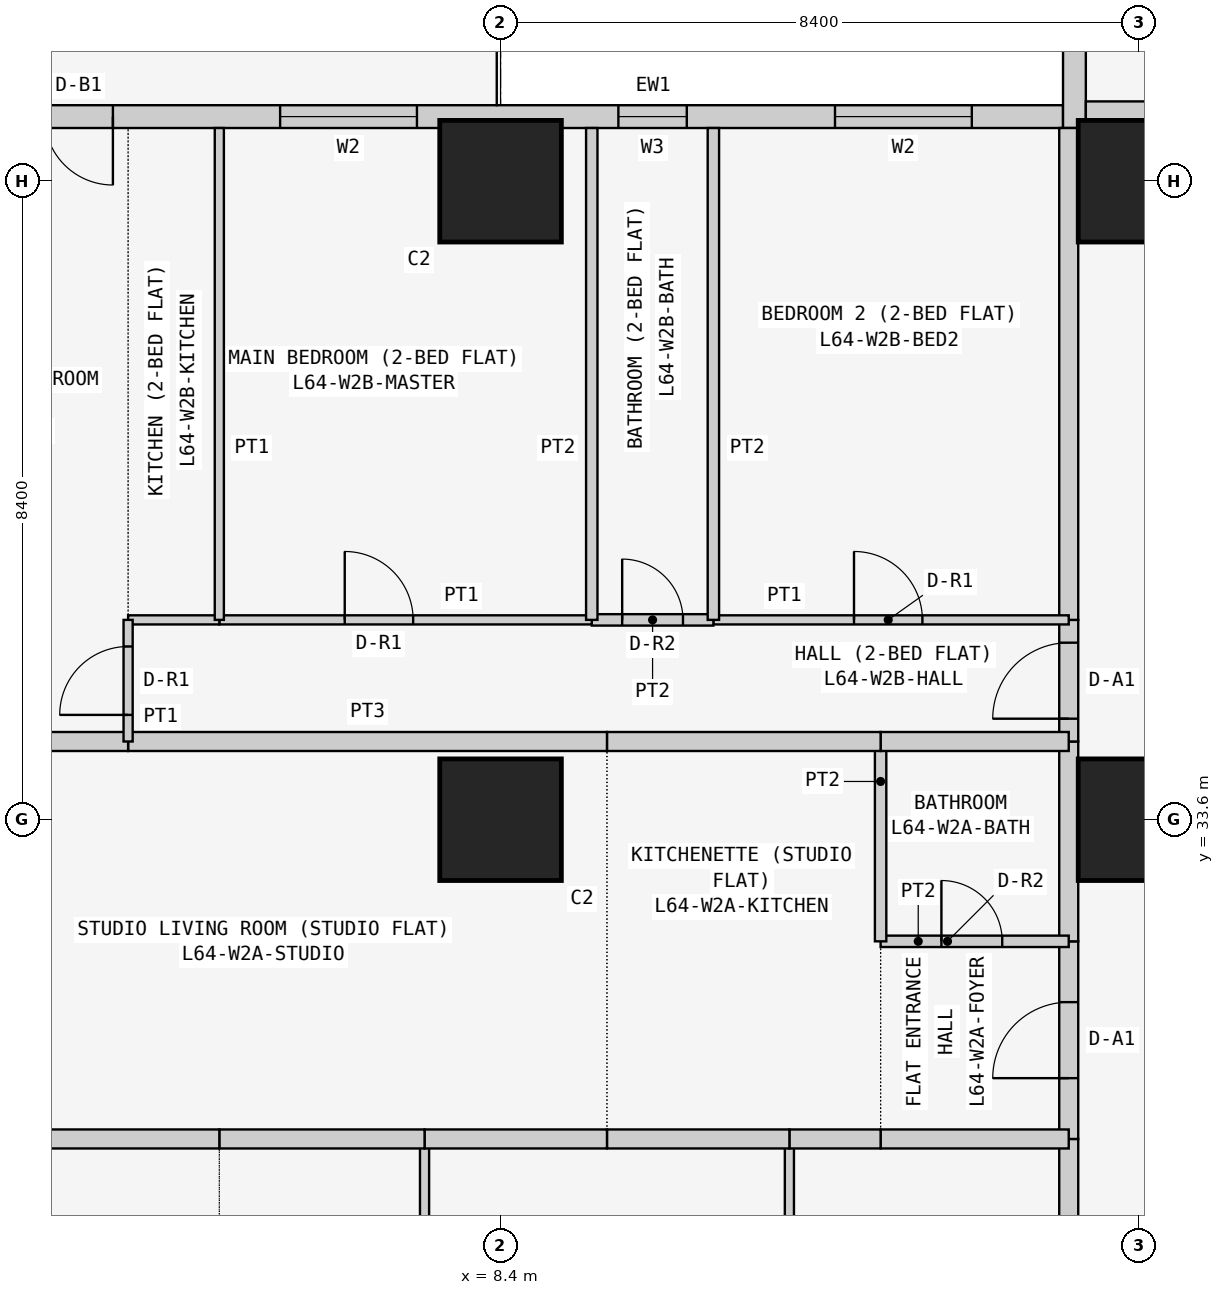
"""IFC4 building model, lengths in metres.
Left out: names, types, materials, properties, quantities, classifications, styles, units other than length and angle.
Written with IfcOpenShell. Run it as: python <this file> out.ifc"""

import sys

from ifc_helpers import new_model, si_unit, direction, frame, frame_2d, origin, origin_2d, place, context, subcontext, project, spatial, rectangle, extrude, element, fill, save


model = new_model("IFC4")
c1 = context("Model", 3, precision=1e-05, world=origin(), true_north=direction((0.0, 1.0)))
c2 = subcontext(c1, "Body", "Model", "MODEL_VIEW")
j1 = project(units=[si_unit("LENGTHUNIT", "METRE"), si_unit("PLANEANGLEUNIT", "RADIAN")], contexts=[c1])
p1 = place(None, origin())
s1 = spatial("IfcSite", under=j1, at=p1, CompositionType="ELEMENT")
p2 = place(p1, origin())
s2 = spatial("IfcBuilding", under=s1, at=p2, CompositionType="ELEMENT")
p3 = place(p2, frame((0.0, 0.0, 244.5)))
s3 = spatial("IfcBuildingStorey", under=s2, at=p3, CompositionType="ELEMENT", Elevation=244.5)
for number, where, z_axis, x_axis in (
    (1, (8.4, 33.6, 0.0), (0.0, 0.0, 1.0), (1.0, 0.0, 0.0)),
    (2, (8.4, 42.0, 0.0), (0.0, 0.0, 1.0), (1.0, 0.0, 0.0)),
    (3, (16.8, 33.6, 0.0), (0.0, 0.0, 1.0), (1.0, 0.0, 0.0)),
    (4, (16.8, 42.0, 0.0), (0.0, 0.0, 1.0), (1.0, 0.0, 0.0)),
):
    element("IfcColumn", number, at=place(p3, frame(where, z_axis=z_axis, x_axis=x_axis)), inside=s3, PredefinedType="COLUMN", context=c2, shape_type="SweptSolid", body=[
        extrude(rectangle(XDim=1.6, YDim=1.6, at=origin_2d()), origin(), (0.0, 0.0, 1.0), 3.6),
    ])
p4 = place(p3, frame((15.8, 42.85, 0.0), z_axis=(0.0, 0.0, 1.0), x_axis=(-1.0, 0.0, 0.0)))
e5 = element("IfcWall", 5, at=p4, inside=s3, PredefinedType="SOLIDWALL", context=c2, shape_type="SweptSolid", body=[
    extrude(rectangle(XDim=15.4, YDim=0.3, at=frame_2d((7.7, 0.0))), origin(), (0.0, 0.0, 1.0), 3.35),
])
p5 = place(p4, frame((1.2, 0.0, 0.9)))
e6 = element("IfcOpeningElement", 6, at=p5, cuts=e5, PredefinedType="OPENING", context=c2, shape_type="SweptSolid", body=[
    extrude(rectangle(XDim=1.8, YDim=1.5, at=frame_2d((0.9, 0.75))), frame((0.0, 0.16, 0.0), z_axis=(0.0, -1.0, 0.0), x_axis=(1.0, 0.0, 0.0)), (0.0, 0.0, 1.0), 0.32),
])
p6 = place(p4, frame((4.95, 0.0, 1.5)))
e7 = element("IfcOpeningElement", 7, at=p6, cuts=e5, PredefinedType="OPENING", context=c2, shape_type="SweptSolid", body=[
    extrude(rectangle(XDim=0.9, YDim=0.7, at=frame_2d((0.45, 0.35))), frame((0.0, 0.16, 0.0), z_axis=(0.0, -1.0, 0.0), x_axis=(1.0, 0.0, 0.0)), (0.0, 0.0, 1.0), 0.32),
])
p7 = place(p4, frame((8.5, 0.0, 0.9)))
e8 = element("IfcOpeningElement", 8, at=p7, cuts=e5, PredefinedType="OPENING", context=c2, shape_type="SweptSolid", body=[
    extrude(rectangle(XDim=1.8, YDim=1.5, at=frame_2d((0.9, 0.75))), frame((0.0, 0.16, 0.0), z_axis=(0.0, -1.0, 0.0), x_axis=(1.0, 0.0, 0.0)), (0.0, 0.0, 1.0), 0.32),
])
p8 = place(p4, frame((12.5, 0.0, 0.0)))
e9 = element("IfcOpeningElement", 9, at=p8, cuts=e5, PredefinedType="OPENING", context=c2, shape_type="SweptSolid", body=[
    extrude(rectangle(XDim=0.9, YDim=2.4, at=frame_2d((0.45, 1.2))), frame((0.0, 0.16, 0.0), z_axis=(0.0, -1.0, 0.0), x_axis=(1.0, 0.0, 0.0)), (0.0, 0.0, 1.0), 0.32),
])
p9 = place(p4, frame((13.5, 0.0, 0.9)))
e10 = element("IfcOpeningElement", 10, at=p9, cuts=e5, PredefinedType="OPENING", context=c2, shape_type="SweptSolid", body=[
    extrude(rectangle(XDim=1.2, YDim=1.5, at=frame_2d((0.6, 0.75))), frame((0.0, 0.16, 0.0), z_axis=(0.0, -1.0, 0.0), x_axis=(1.0, 0.0, 0.0)), (0.0, 0.0, 1.0), 0.32),
])
p10 = place(p3, frame((15.95, 50.0, 0.0), z_axis=(0.0, 0.0, 1.0), x_axis=(0.0, -1.0, 0.0)))
e11 = element("IfcWall", 11, at=p10, inside=s3, PredefinedType="SOLIDWALL", context=c2, shape_type="SweptSolid", body=[
    extrude(rectangle(XDim=7.3, YDim=0.3, at=frame_2d((3.65, 0.0))), origin(), (0.0, 0.0, 1.0), 3.35),
])
p11 = place(p10, frame((3.1, 0.0, 0.9)))
e12 = element("IfcOpeningElement", 12, at=p11, cuts=e11, PredefinedType="OPENING", context=c2, shape_type="SweptSolid", body=[
    extrude(rectangle(XDim=2.4, YDim=1.5, at=frame_2d((1.2, 0.75))), frame((0.0, 0.16, 0.0), z_axis=(0.0, -1.0, 0.0), x_axis=(1.0, 0.0, 0.0)), (0.0, 0.0, 1.0), 0.32),
])
p12 = place(p10, frame((0.75, 0.0, 0.9)))
e13 = element("IfcOpeningElement", 13, at=p12, cuts=e11, PredefinedType="OPENING", context=c2, shape_type="SweptSolid", body=[
    extrude(rectangle(XDim=1.2, YDim=1.5, at=frame_2d((0.6, 0.75))), frame((0.0, 0.16, 0.0), z_axis=(0.0, -1.0, 0.0), x_axis=(1.0, 0.0, 0.0)), (0.0, 0.0, 1.0), 0.32),
])
p13 = place(p3, frame((16.1, 42.925, 0.0), z_axis=(0.0, 0.0, 1.0), x_axis=(1.0, 0.0, 0.0)))
e14 = element("IfcWall", 14, at=p13, inside=s3, PredefinedType="PARTITIONING", context=c2, shape_type="SweptSolid", body=[
    extrude(rectangle(XDim=6.871, YDim=0.25, at=frame_2d((3.436, 0.0))), origin(), (0.0, 0.0, 1.0), 3.35),
])
p14 = place(p3, frame((15.875, 24.171, 0.0), z_axis=(0.0, 0.0, 1.0), x_axis=(0.0, 1.0, 0.0)))
e15 = element("IfcWall", 15, at=p14, inside=s3, PredefinedType="PARTITIONING", context=c2, shape_type="SweptSolid", body=[
    extrude(rectangle(XDim=5.229, YDim=0.25, at=frame_2d((2.615, 0.0))), origin(), (0.0, 0.0, 1.0), 3.35),
])
p15 = place(p14, frame((2.129, 0.0, 0.0)))
e16 = element("IfcOpeningElement", 16, at=p15, cuts=e15, PredefinedType="OPENING", context=c2, shape_type="SweptSolid", body=[
    extrude(rectangle(XDim=1.0, YDim=2.1, at=frame_2d((0.5, 1.05))), frame((0.0, 0.135, 0.0), z_axis=(0.0, -1.0, 0.0), x_axis=(1.0, 0.0, 0.0)), (0.0, 0.0, 1.0), 0.27),
])
p16 = place(p3, frame((15.875, 29.4, 0.0), z_axis=(0.0, 0.0, 1.0), x_axis=(0.0, 1.0, 0.0)))
e17 = element("IfcWall", 17, at=p16, inside=s3, PredefinedType="PARTITIONING", context=c2, shape_type="SweptSolid", body=[
    extrude(rectangle(XDim=2.6, YDim=0.25, at=frame_2d((1.3, 0.0))), origin(), (0.0, 0.0, 1.0), 3.35),
])
p17 = place(p16, frame((0.8, 0.0, 0.0)))
e18 = element("IfcOpeningElement", 18, at=p17, cuts=e17, PredefinedType="OPENING", context=c2, shape_type="SweptSolid", body=[
    extrude(rectangle(XDim=1.0, YDim=2.1, at=frame_2d((0.5, 1.05))), frame((0.0, 0.135, 0.0), z_axis=(0.0, -1.0, 0.0), x_axis=(1.0, 0.0, 0.0)), (0.0, 0.0, 1.0), 0.27),
])
p18 = place(p3, frame((15.875, 32.0, 0.0), z_axis=(0.0, 0.0, 1.0), x_axis=(0.0, 1.0, 0.0)))
e19 = element("IfcWall", 19, at=p18, inside=s3, PredefinedType="PARTITIONING", context=c2, shape_type="SweptSolid", body=[
    extrude(rectangle(XDim=2.629, YDim=0.25, at=frame_2d((1.314, 0.0))), origin(), (0.0, 0.0, 1.0), 3.35),
])
p19 = place(p3, frame((15.875, 34.629, 0.0), z_axis=(0.0, 0.0, 1.0), x_axis=(0.0, 1.0, 0.0)))
e20 = element("IfcWall", 20, at=p19, inside=s3, PredefinedType="PARTITIONING", context=c2, shape_type="SweptSolid", body=[
    extrude(rectangle(XDim=1.6, YDim=0.25, at=frame_2d((0.8, 0.0))), origin(), (0.0, 0.0, 1.0), 3.35),
])
p20 = place(p19, frame((0.3, 0.0, 0.0)))
e21 = element("IfcOpeningElement", 21, at=p20, cuts=e20, PredefinedType="OPENING", context=c2, shape_type="SweptSolid", body=[
    extrude(rectangle(XDim=1.0, YDim=2.1, at=frame_2d((0.5, 1.05))), frame((0.0, 0.135, 0.0), z_axis=(0.0, -1.0, 0.0), x_axis=(1.0, 0.0, 0.0)), (0.0, 0.0, 1.0), 0.27),
])
p21 = place(p3, frame((15.875, 36.229, 0.0), z_axis=(0.0, 0.0, 1.0), x_axis=(0.0, 1.0, 0.0)))
e22 = element("IfcWall", 22, at=p21, inside=s3, PredefinedType="PARTITIONING", context=c2, shape_type="SweptSolid", body=[
    extrude(rectangle(XDim=6.471, YDim=0.25, at=frame_2d((3.235, 0.0))), origin(), (0.0, 0.0, 1.0), 3.35),
])
p22 = place(p3, frame((12.2, 29.4, 0.0), z_axis=(0.0, 0.0, 1.0), x_axis=(0.0, -1.0, 0.0)))
e23 = element("IfcWall", 23, at=p22, inside=s3, PredefinedType="PARTITIONING", context=c2, shape_type="SweptSolid", body=[
    extrude(rectangle(XDim=5.229, YDim=0.12, at=frame_2d((2.615, 0.0))), origin(), (0.0, 0.0, 1.0), 3.35),
])
p23 = place(p3, frame((15.875, 29.4, 0.0), z_axis=(0.0, 0.0, 1.0), x_axis=(-1.0, 0.0, 0.0)))
e24 = element("IfcWall", 24, at=p23, inside=s3, PredefinedType="PARTITIONING", context=c2, shape_type="SweptSolid", body=[
    extrude(rectangle(XDim=2.475, YDim=0.25, at=frame_2d((1.238, 0.0))), origin(), (0.0, 0.0, 1.0), 3.35),
])
p24 = place(p3, frame((13.4, 29.4, 0.0), z_axis=(0.0, 0.0, 1.0), x_axis=(-1.0, 0.0, 0.0)))
e25 = element("IfcWall", 25, at=p24, inside=s3, PredefinedType="PARTITIONING", context=c2, shape_type="SweptSolid", body=[
    extrude(rectangle(XDim=1.2, YDim=0.25, at=frame_2d((0.6, 0.0))), origin(), (0.0, 0.0, 1.0), 3.35),
])
p25 = place(p3, frame((7.4, 29.4, 0.0), z_axis=(0.0, 0.0, 1.0), x_axis=(0.0, -1.0, 0.0)))
e26 = element("IfcWall", 26, at=p25, inside=s3, PredefinedType="PARTITIONING", context=c2, shape_type="SweptSolid", body=[
    extrude(rectangle(XDim=5.229, YDim=0.12, at=frame_2d((2.615, 0.0))), origin(), (0.0, 0.0, 1.0), 3.35),
])
p26 = place(p3, frame((12.2, 29.4, 0.0), z_axis=(0.0, 0.0, 1.0), x_axis=(-1.0, 0.0, 0.0)))
e27 = element("IfcWall", 27, at=p26, inside=s3, PredefinedType="PARTITIONING", context=c2, shape_type="SweptSolid", body=[
    extrude(rectangle(XDim=2.4, YDim=0.25, at=frame_2d((1.2, 0.0))), origin(), (0.0, 0.0, 1.0), 3.35),
])
p27 = place(p3, frame((9.8, 29.4, 0.0), z_axis=(0.0, 0.0, 1.0), x_axis=(-1.0, 0.0, 0.0)))
e28 = element("IfcWall", 28, at=p27, inside=s3, PredefinedType="PARTITIONING", context=c2, shape_type="SweptSolid", body=[
    extrude(rectangle(XDim=2.4, YDim=0.25, at=frame_2d((1.2, 0.0))), origin(), (0.0, 0.0, 1.0), 3.35),
])
p28 = place(p3, frame((7.4, 29.4, 0.0), z_axis=(0.0, 0.0, 1.0), x_axis=(-1.0, 0.0, 0.0)))
e29 = element("IfcWall", 29, at=p28, inside=s3, PredefinedType="PARTITIONING", context=c2, shape_type="SweptSolid", body=[
    extrude(rectangle(XDim=2.7, YDim=0.25, at=frame_2d((1.35, 0.0))), origin(), (0.0, 0.0, 1.0), 3.35),
])
p29 = place(p3, frame((4.7, 29.4, 0.0), z_axis=(0.0, 0.0, 1.0), x_axis=(-1.0, 0.0, 0.0)))
e30 = element("IfcWall", 30, at=p29, inside=s3, PredefinedType="PARTITIONING", context=c2, shape_type="SweptSolid", body=[
    extrude(rectangle(XDim=5.35, YDim=0.25, at=frame_2d((2.675, 0.0))), origin(), (0.0, 0.0, 1.0), 3.35),
])
p30 = place(p3, frame((13.4, 32.0, 0.0), z_axis=(0.0, 0.0, 1.0), x_axis=(1.0, 0.0, 0.0)))
e31 = element("IfcWall", 31, at=p30, inside=s3, PredefinedType="PARTITIONING", context=c2, shape_type="SweptSolid", body=[
    extrude(rectangle(XDim=2.475, YDim=0.15, at=frame_2d((1.238, 0.0))), origin(), (0.0, 0.0, 1.0), 3.35),
])
p31 = place(p30, frame((0.8, 0.0, 0.0)))
e32 = element("IfcOpeningElement", 32, at=p31, cuts=e31, PredefinedType="OPENING", context=c2, shape_type="SweptSolid", body=[
    extrude(rectangle(XDim=0.8, YDim=2.1, at=frame_2d((0.4, 1.05))), frame((0.0, 0.085, 0.0), z_axis=(0.0, -1.0, 0.0), x_axis=(1.0, 0.0, 0.0)), (0.0, 0.0, 1.0), 0.17),
])
p32 = place(p3, frame((13.4, 32.0, 0.0), z_axis=(0.0, 0.0, 1.0), x_axis=(0.0, 1.0, 0.0)))
e33 = element("IfcWall", 33, at=p32, inside=s3, PredefinedType="PARTITIONING", context=c2, shape_type="SweptSolid", body=[
    extrude(rectangle(XDim=2.629, YDim=0.15, at=frame_2d((1.314, 0.0))), origin(), (0.0, 0.0, 1.0), 3.35),
])
p33 = place(p3, frame((13.4, 34.629, 0.0), z_axis=(0.0, 0.0, 1.0), x_axis=(1.0, 0.0, 0.0)))
e34 = element("IfcWall", 34, at=p33, inside=s3, PredefinedType="PARTITIONING", context=c2, shape_type="SweptSolid", body=[
    extrude(rectangle(XDim=2.475, YDim=0.25, at=frame_2d((1.238, 0.0))), origin(), (0.0, 0.0, 1.0), 3.35),
])
p34 = place(p3, frame((9.8, 34.629, 0.0), z_axis=(0.0, 0.0, 1.0), x_axis=(1.0, 0.0, 0.0)))
e35 = element("IfcWall", 35, at=p34, inside=s3, PredefinedType="PARTITIONING", context=c2, shape_type="SweptSolid", body=[
    extrude(rectangle(XDim=3.6, YDim=0.25, at=frame_2d((1.8, 0.0))), origin(), (0.0, 0.0, 1.0), 3.35),
])
p35 = place(p3, frame((3.5, 34.629, 0.0), z_axis=(0.0, 0.0, 1.0), x_axis=(1.0, 0.0, 0.0)))
e36 = element("IfcWall", 36, at=p35, inside=s3, PredefinedType="PARTITIONING", context=c2, shape_type="SweptSolid", body=[
    extrude(rectangle(XDim=6.3, YDim=0.25, at=frame_2d((3.15, 0.0))), origin(), (0.0, 0.0, 1.0), 3.35),
])
p36 = place(p3, frame((-0.65, 34.629, 0.0), z_axis=(0.0, 0.0, 1.0), x_axis=(1.0, 0.0, 0.0)))
e37 = element("IfcWall", 37, at=p36, inside=s3, PredefinedType="PARTITIONING", context=c2, shape_type="SweptSolid", body=[
    extrude(rectangle(XDim=4.15, YDim=0.25, at=frame_2d((2.075, 0.0))), origin(), (0.0, 0.0, 1.0), 3.35),
])
p37 = place(p3, frame((11.2, 36.229, 0.0), z_axis=(0.0, 0.0, 1.0), x_axis=(1.0, 0.0, 0.0)))
e38 = element("IfcWall", 38, at=p37, inside=s3, PredefinedType="PARTITIONING", context=c2, shape_type="SweptSolid", body=[
    extrude(rectangle(XDim=4.675, YDim=0.12, at=frame_2d((2.337, 0.0))), origin(), (0.0, 0.0, 1.0), 3.35),
])
p38 = place(p37, frame((1.85, 0.0, 0.0)))
e39 = element("IfcOpeningElement", 39, at=p38, cuts=e38, PredefinedType="OPENING", context=c2, shape_type="SweptSolid", body=[
    extrude(rectangle(XDim=0.9, YDim=2.1, at=frame_2d((0.45, 1.05))), frame((0.0, 0.07, 0.0), z_axis=(0.0, -1.0, 0.0), x_axis=(1.0, 0.0, 0.0)), (0.0, 0.0, 1.0), 0.14),
])
p39 = place(p3, frame((9.6, 36.229, 0.0), z_axis=(0.0, 0.0, 1.0), x_axis=(1.0, 0.0, 0.0)))
e40 = element("IfcWall", 40, at=p39, inside=s3, PredefinedType="PARTITIONING", context=c2, shape_type="SweptSolid", body=[
    extrude(rectangle(XDim=1.6, YDim=0.15, at=frame_2d((0.8, 0.0))), origin(), (0.0, 0.0, 1.0), 3.35),
])
p40 = place(p39, frame((0.4, 0.0, 0.0)))
e41 = element("IfcOpeningElement", 41, at=p40, cuts=e40, PredefinedType="OPENING", context=c2, shape_type="SweptSolid", body=[
    extrude(rectangle(XDim=0.8, YDim=2.1, at=frame_2d((0.4, 1.05))), frame((0.0, 0.085, 0.0), z_axis=(0.0, -1.0, 0.0), x_axis=(1.0, 0.0, 0.0)), (0.0, 0.0, 1.0), 0.17),
])
p41 = place(p3, frame((4.7, 36.229, 0.0), z_axis=(0.0, 0.0, 1.0), x_axis=(1.0, 0.0, 0.0)))
e42 = element("IfcWall", 42, at=p41, inside=s3, PredefinedType="PARTITIONING", context=c2, shape_type="SweptSolid", body=[
    extrude(rectangle(XDim=4.9, YDim=0.12, at=frame_2d((2.45, 0.0))), origin(), (0.0, 0.0, 1.0), 3.35),
])
p42 = place(p41, frame((1.65, 0.0, 0.0)))
e43 = element("IfcOpeningElement", 43, at=p42, cuts=e42, PredefinedType="OPENING", context=c2, shape_type="SweptSolid", body=[
    extrude(rectangle(XDim=0.9, YDim=2.1, at=frame_2d((0.45, 1.05))), frame((0.0, 0.07, 0.0), z_axis=(0.0, -1.0, 0.0), x_axis=(1.0, 0.0, 0.0)), (0.0, 0.0, 1.0), 0.14),
])
p43 = place(p3, frame((3.5, 36.229, 0.0), z_axis=(0.0, 0.0, 1.0), x_axis=(1.0, 0.0, 0.0)))
e44 = element("IfcWall", 44, at=p43, inside=s3, PredefinedType="PARTITIONING", context=c2, shape_type="SweptSolid", body=[
    extrude(rectangle(XDim=1.2, YDim=0.12, at=frame_2d((0.6, 0.0))), origin(), (0.0, 0.0, 1.0), 3.35),
])
p44 = place(p3, frame((3.5, 34.629, 0.0), z_axis=(0.0, 0.0, 1.0), x_axis=(0.0, 1.0, 0.0)))
e45 = element("IfcWall", 45, at=p44, inside=s3, PredefinedType="PARTITIONING", context=c2, shape_type="SweptSolid", body=[
    extrude(rectangle(XDim=1.6, YDim=0.12, at=frame_2d((0.8, 0.0))), origin(), (0.0, 0.0, 1.0), 3.35),
])
p45 = place(p44, frame((0.35, 0.0, 0.0)))
e46 = element("IfcOpeningElement", 46, at=p45, cuts=e45, PredefinedType="OPENING", context=c2, shape_type="SweptSolid", body=[
    extrude(rectangle(XDim=0.9, YDim=2.1, at=frame_2d((0.45, 1.05))), frame((0.0, 0.07, 0.0), z_axis=(0.0, -1.0, 0.0), x_axis=(1.0, 0.0, 0.0)), (0.0, 0.0, 1.0), 0.14),
])
for number, where, z_axis, x_axis in (
    (47, (11.2, 36.229, 0.0), (0.0, 0.0, 1.0), (0.0, 1.0, 0.0)),
    (48, (9.6, 36.229, 0.0), (0.0, 0.0, 1.0), (0.0, 1.0, 0.0)),
):
    element("IfcWall", number, at=place(p3, frame(where, z_axis=z_axis, x_axis=x_axis)), inside=s3, PredefinedType="PARTITIONING", context=c2, shape_type="SweptSolid", body=[
        extrude(rectangle(XDim=6.471, YDim=0.15, at=frame_2d((3.235, 0.0))), origin(), (0.0, 0.0, 1.0), 3.35),
    ])
p46 = place(p3, frame((4.7, 36.229, 0.0), z_axis=(0.0, 0.0, 1.0), x_axis=(0.0, 1.0, 0.0)))
e49 = element("IfcWall", 49, at=p46, inside=s3, PredefinedType="PARTITIONING", context=c2, shape_type="SweptSolid", body=[
    extrude(rectangle(XDim=6.471, YDim=0.12, at=frame_2d((3.235, 0.0))), origin(), (0.0, 0.0, 1.0), 3.35),
])
p47 = place(p5, origin())
e50 = element("IfcWindow", 50, at=p47, inside=s3, PartitioningType="SINGLE_PANEL", PredefinedType="WINDOW", context=c2, shape_type="SweptSolid", body=[
    extrude(rectangle(XDim=1.8, YDim=1.5, at=frame_2d((0.9, 0.75))), frame((0.0, 0.03, 0.0), z_axis=(0.0, -1.0, 0.0), x_axis=(1.0, 0.0, 0.0)), (0.0, 0.0, 1.0), 0.06),
])
fill(e6, e50)
p48 = place(p6, origin())
e51 = element("IfcWindow", 51, at=p48, inside=s3, PartitioningType="SINGLE_PANEL", PredefinedType="WINDOW", context=c2, shape_type="SweptSolid", body=[
    extrude(rectangle(XDim=0.9, YDim=0.7, at=frame_2d((0.45, 0.35))), frame((0.0, 0.03, 0.0), z_axis=(0.0, -1.0, 0.0), x_axis=(1.0, 0.0, 0.0)), (0.0, 0.0, 1.0), 0.06),
])
fill(e7, e51)
p49 = place(p7, origin())
e52 = element("IfcWindow", 52, at=p49, inside=s3, PartitioningType="SINGLE_PANEL", PredefinedType="WINDOW", context=c2, shape_type="SweptSolid", body=[
    extrude(rectangle(XDim=1.8, YDim=1.5, at=frame_2d((0.9, 0.75))), frame((0.0, 0.03, 0.0), z_axis=(0.0, -1.0, 0.0), x_axis=(1.0, 0.0, 0.0)), (0.0, 0.0, 1.0), 0.06),
])
fill(e8, e52)
p50 = place(p8, origin())
e53 = element("IfcDoor", 53, at=p50, inside=s3, OperationType="SINGLE_SWING_LEFT", PredefinedType="DOOR", context=c2, shape_type="SweptSolid", body=[
    extrude(rectangle(XDim=0.9, YDim=2.4, at=frame_2d((0.45, 1.2))), frame((0.0, 0.025, 0.0), z_axis=(0.0, -1.0, 0.0), x_axis=(1.0, 0.0, 0.0)), (0.0, 0.0, 1.0), 0.05),
])
fill(e9, e53)
p51 = place(p17, origin())
e54 = element("IfcDoor", 54, at=p51, inside=s3, OperationType="SINGLE_SWING_LEFT", PredefinedType="DOOR", context=c2, shape_type="SweptSolid", body=[
    extrude(rectangle(XDim=1.0, YDim=2.1, at=frame_2d((0.5, 1.05))), frame((0.0, 0.025, 0.0), z_axis=(0.0, -1.0, 0.0), x_axis=(1.0, 0.0, 0.0)), (0.0, 0.0, 1.0), 0.05),
])
fill(e18, e54)
p52 = place(p31, origin())
e55 = element("IfcDoor", 55, at=p52, inside=s3, OperationType="SINGLE_SWING_LEFT", PredefinedType="DOOR", context=c2, shape_type="SweptSolid", body=[
    extrude(rectangle(XDim=0.8, YDim=2.1, at=frame_2d((0.4, 1.05))), frame((0.0, 0.025, 0.0), z_axis=(0.0, -1.0, 0.0), x_axis=(1.0, 0.0, 0.0)), (0.0, 0.0, 1.0), 0.05),
])
fill(e32, e55)
p53 = place(p20, origin())
e56 = element("IfcDoor", 56, at=p53, inside=s3, OperationType="SINGLE_SWING_LEFT", PredefinedType="DOOR", context=c2, shape_type="SweptSolid", body=[
    extrude(rectangle(XDim=1.0, YDim=2.1, at=frame_2d((0.5, 1.05))), frame((0.0, 0.025, 0.0), z_axis=(0.0, -1.0, 0.0), x_axis=(1.0, 0.0, 0.0)), (0.0, 0.0, 1.0), 0.05),
])
fill(e21, e56)
p54 = place(p38, origin())
e57 = element("IfcDoor", 57, at=p54, inside=s3, OperationType="SINGLE_SWING_LEFT", PredefinedType="DOOR", context=c2, shape_type="SweptSolid", body=[
    extrude(rectangle(XDim=0.9, YDim=2.1, at=frame_2d((0.45, 1.05))), frame((0.0, 0.025, 0.0), z_axis=(0.0, -1.0, 0.0), x_axis=(1.0, 0.0, 0.0)), (0.0, 0.0, 1.0), 0.05),
])
fill(e39, e57)
p55 = place(p40, origin())
e58 = element("IfcDoor", 58, at=p55, inside=s3, OperationType="SINGLE_SWING_LEFT", PredefinedType="DOOR", context=c2, shape_type="SweptSolid", body=[
    extrude(rectangle(XDim=0.8, YDim=2.1, at=frame_2d((0.4, 1.05))), frame((0.0, 0.025, 0.0), z_axis=(0.0, -1.0, 0.0), x_axis=(1.0, 0.0, 0.0)), (0.0, 0.0, 1.0), 0.05),
])
fill(e41, e58)
p56 = place(p42, origin())
e59 = element("IfcDoor", 59, at=p56, inside=s3, OperationType="SINGLE_SWING_LEFT", PredefinedType="DOOR", context=c2, shape_type="SweptSolid", body=[
    extrude(rectangle(XDim=0.9, YDim=2.1, at=frame_2d((0.45, 1.05))), frame((0.0, 0.025, 0.0), z_axis=(0.0, -1.0, 0.0), x_axis=(1.0, 0.0, 0.0)), (0.0, 0.0, 1.0), 0.05),
])
fill(e43, e59)
p57 = place(p45, origin())
e60 = element("IfcDoor", 60, at=p57, inside=s3, OperationType="SINGLE_SWING_LEFT", PredefinedType="DOOR", context=c2, shape_type="SweptSolid", body=[
    extrude(rectangle(XDim=0.9, YDim=2.1, at=frame_2d((0.45, 1.05))), frame((0.0, 0.025, 0.0), z_axis=(0.0, -1.0, 0.0), x_axis=(1.0, 0.0, 0.0)), (0.0, 0.0, 1.0), 0.05),
])
fill(e46, e60)
save(model, sys.argv[1])
